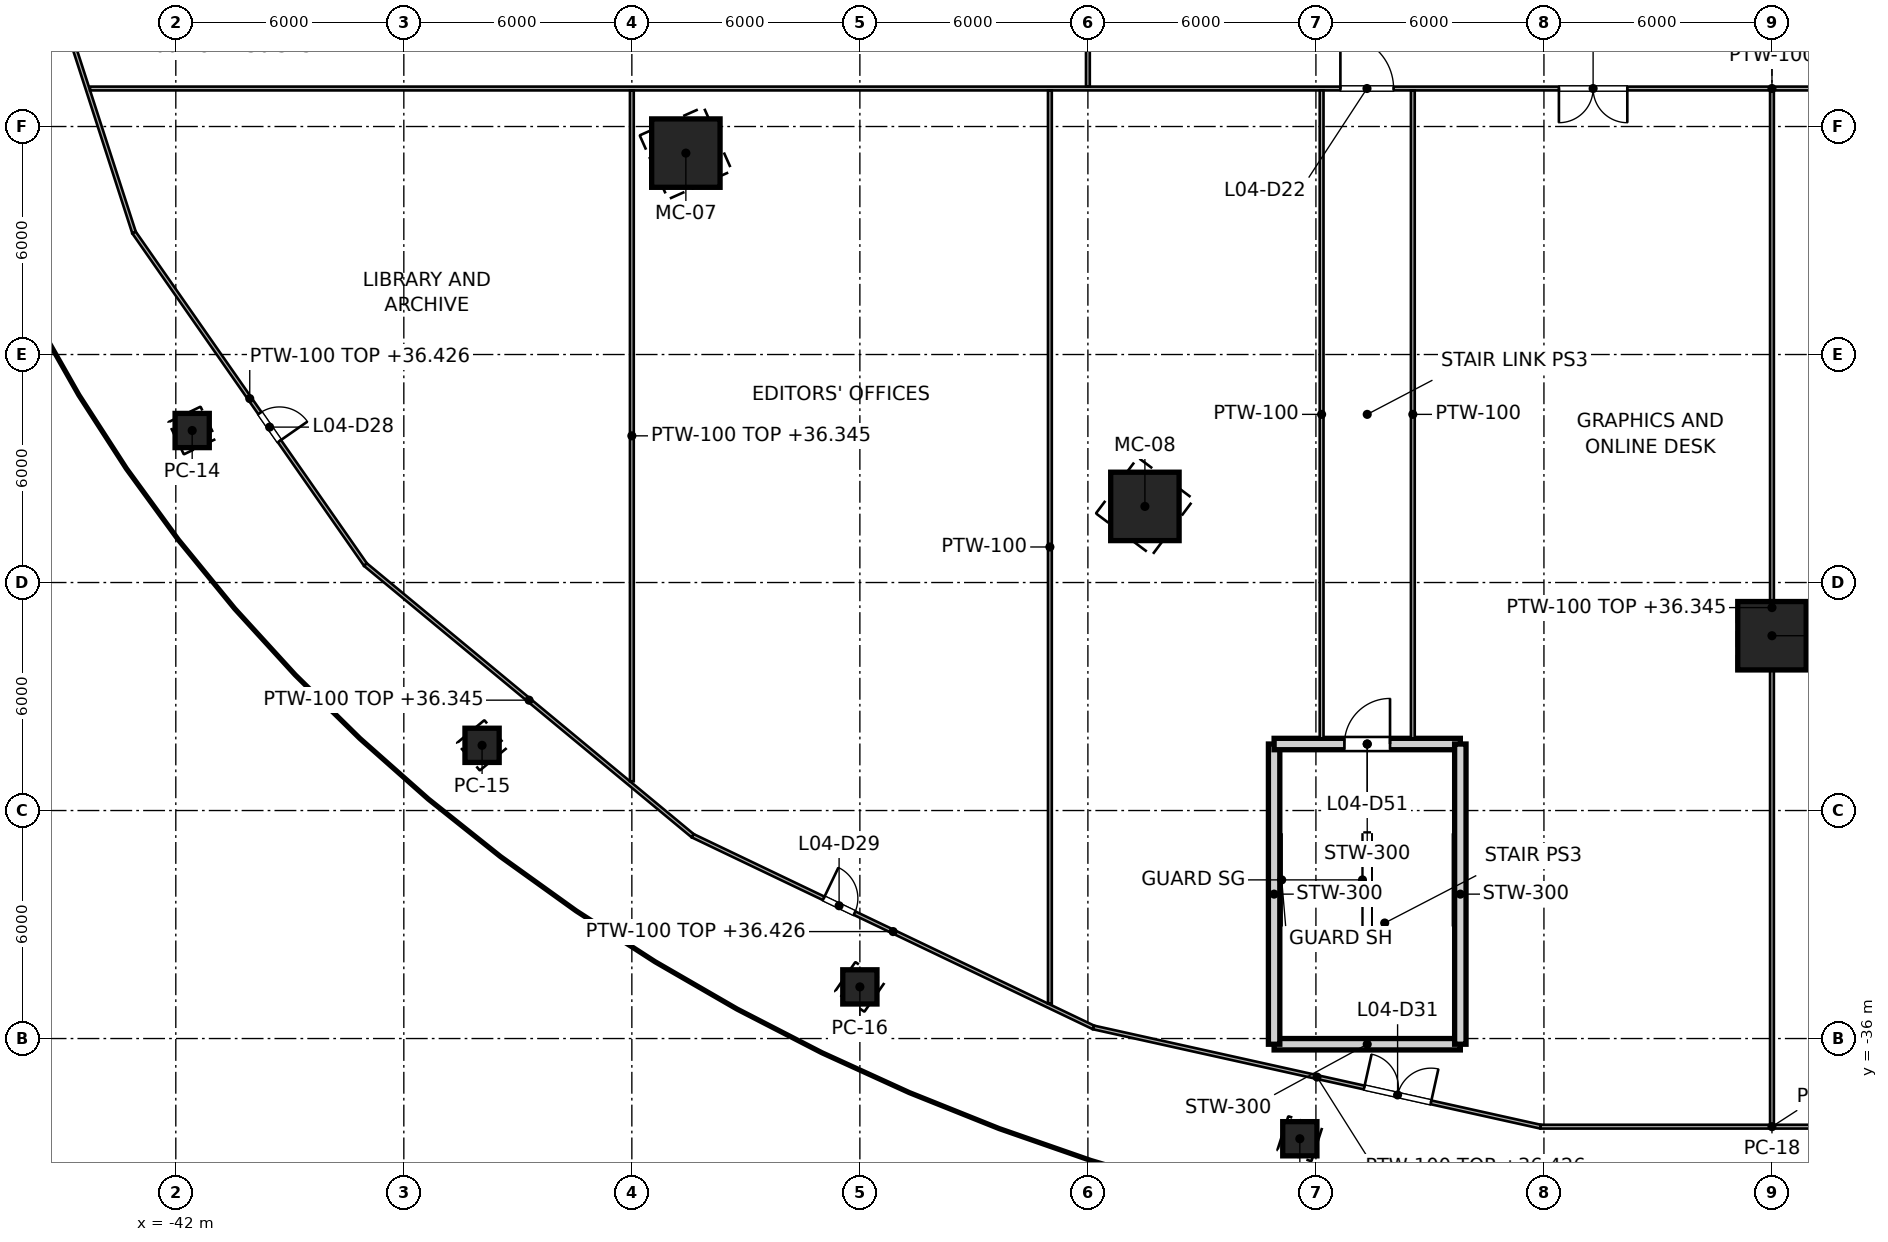
"""IFC4 building model, lengths in metres.
Left out: names, types, materials, properties, quantities, classifications, styles, units other than length and angle.
Written with IfcOpenShell. Run it as: python <this file> out.ifc"""

import sys

from ifc_helpers import new_model, si_unit, direction, frame, frame_2d, origin, origin_2d, place, context, subcontext, project, spatial, rectangle, hollow_rectangle, extrude, element, fill, save


model = new_model("IFC4")
c1 = context("Model", 3, precision=1e-05, world=origin(), true_north=direction((0.0, 1.0)))
c2 = subcontext(c1, "Body", "Model", "MODEL_VIEW")
j1 = project(units=[si_unit("LENGTHUNIT", "METRE"), si_unit("PLANEANGLEUNIT", "RADIAN")], contexts=[c1])
p1 = place(None, origin())
s1 = spatial("IfcSite", under=j1, at=p1, CompositionType="ELEMENT")
p2 = place(p1, origin())
s2 = spatial("IfcBuilding", under=s1, at=p2, CompositionType="ELEMENT")
p3 = place(p2, frame((0.0, 0.0, 31.4)))
s3 = spatial("IfcBuildingStorey", under=s2, at=p3, CompositionType="ELEMENT", Elevation=31.4)
for number, where, z_axis, x_axis in (
    (1, (-28.579, -12.7, 0.0), (0.0, 0.0, 1.0), (-0.914, -0.406, 0.0)),
    (2, (-16.5, -21.997, 0.0), (0.0, 0.0, 1.0), (-0.6, -0.8, 0.0)),
    (3, (0.0, -25.4, 0.0), (0.0, 0.0, 1.0), (0.0, -1.0, 0.0)),
):
    element("IfcColumn", number, at=place(p3, frame(where, z_axis=z_axis, x_axis=x_axis)), inside=s3, PredefinedType="COLUMN", context=c2, shape_type="SweptSolid", body=[
        extrude(hollow_rectangle(XDim=1.8, YDim=1.8, WallThickness=0.08, at=origin_2d()), origin(), (0.0, 0.0, 1.0), 6.0),
    ])
for number, where, z_axis, x_axis in (
    (4, (-41.569, -20.0, 0.0), (0.0, 0.0, 1.0), (-0.901, -0.434, 0.0)),
    (5, (-33.941, -28.284, 0.0), (0.0, 0.0, 1.0), (-0.768, -0.64, 0.0)),
    (6, (-24.0, -34.641, 0.0), (0.0, 0.0, 1.0), (-0.569, -0.822, 0.0)),
    (7, (-12.423, -38.637, 0.0), (0.0, 0.0, 1.0), (-0.306, -0.952, 0.0)),
):
    element("IfcColumn", number, at=place(p3, frame(where, z_axis=z_axis, x_axis=x_axis)), inside=s3, PredefinedType="COLUMN", context=c2, shape_type="SweptSolid", body=[
        extrude(hollow_rectangle(XDim=0.9, YDim=0.9, WallThickness=0.04, at=origin_2d()), origin(), (0.0, 0.0, 1.0), 6.0),
    ])
p4 = place(p3, frame((-8.2, -36.15, 0.0), z_axis=(0.0, 0.0, 1.0), x_axis=(-1.0, 0.0, 0.0)))
e8 = element("IfcWall", 8, at=p4, inside=s3, PredefinedType="SOLIDWALL", context=c2, shape_type="SweptSolid", body=[
    extrude(rectangle(XDim=4.9, YDim=0.3, at=frame_2d((2.45, 0.0))), origin(), (0.0, 0.0, 1.0), 5.8),
])
p5 = place(p3, frame((-13.1, -36.15, 0.0), z_axis=(0.0, 0.0, 1.0), x_axis=(0.0, 1.0, 0.0)))
e9 = element("IfcWall", 9, at=p5, inside=s3, PredefinedType="SOLIDWALL", context=c2, shape_type="SweptSolid", body=[
    extrude(rectangle(XDim=7.9, YDim=0.3, at=frame_2d((3.95, 0.0))), origin(), (0.0, 0.0, 1.0), 5.8),
])
p6 = place(p3, frame((-13.1, -28.25, 0.0), z_axis=(0.0, 0.0, 1.0), x_axis=(1.0, 0.0, 0.0)))
e10 = element("IfcWall", 10, at=p6, inside=s3, PredefinedType="SOLIDWALL", context=c2, shape_type="SweptSolid", body=[
    extrude(rectangle(XDim=4.9, YDim=0.3, at=frame_2d((2.45, 0.0))), origin(), (0.0, 0.0, 1.0), 5.8),
])
p7 = place(p6, frame((1.85, 0.0, 0.0)))
e11 = element("IfcOpeningElement", 11, at=p7, cuts=e10, PredefinedType="OPENING", context=c2, shape_type="SweptSolid", body=[
    extrude(rectangle(XDim=1.2, YDim=2.1, at=frame_2d((0.6, 1.05))), frame((0.0, 0.15, 0.0), z_axis=(0.0, -1.0, 0.0), x_axis=(1.0, 0.0, 0.0)), (0.0, 0.0, 1.0), 0.3),
])
p8 = place(p3, frame((-8.2, -28.25, 0.0), z_axis=(0.0, 0.0, 1.0), x_axis=(0.0, -1.0, 0.0)))
e12 = element("IfcWall", 12, at=p8, inside=s3, PredefinedType="SOLIDWALL", context=c2, shape_type="SweptSolid", body=[
    extrude(rectangle(XDim=7.9, YDim=0.3, at=frame_2d((3.95, 0.0))), origin(), (0.0, 0.0, 1.0), 5.8),
])
p9 = place(p3, frame((-46.251, -5.045, 0.0), z_axis=(0.0, 0.0, 1.0), x_axis=(0.307713034182, -0.951479210805, 0.0)))
e13 = element("IfcWall", 13, at=p9, inside=s3, PredefinedType="PARTITIONING", context=c2, shape_type="SweptSolid", body=[
    extrude(rectangle(XDim=10.243, YDim=0.1, at=frame_2d((5.122, 0.0))), origin(), (0.0, 0.0, 1.0), 4.945),
])
p10 = place(p3, frame((-43.099, -14.791, 0.0), z_axis=(0.0, 0.0, 1.0), x_axis=(0.571737958261, -0.820436290692, 0.0)))
e14 = element("IfcWall", 14, at=p10, inside=s3, PredefinedType="PARTITIONING", context=c2, shape_type="SweptSolid", body=[
    extrude(rectangle(XDim=10.65, YDim=0.1, at=frame_2d((5.325, 0.0))), origin(), (0.0, 0.0, 1.0), 5.026),
])
p11 = place(p10, frame((5.79, 0.0, 0.0)))
e15 = element("IfcOpeningElement", 15, at=p11, cuts=e14, PredefinedType="OPENING", context=c2, shape_type="SweptSolid", body=[
    extrude(rectangle(XDim=0.9, YDim=2.1, at=frame_2d((0.45, 1.05))), frame((0.0, 0.05, 0.0), z_axis=(0.0, -1.0, 0.0), x_axis=(1.0, 0.0, 0.0)), (0.0, 0.0, 1.0), 0.1),
])
p12 = place(p3, frame((-37.01, -23.529, 0.0), z_axis=(0.0, 0.0, 1.0), x_axis=(0.770046995363, -0.637987166746, 0.0)))
e16 = element("IfcWall", 16, at=p12, inside=s3, PredefinedType="PARTITIONING", context=c2, shape_type="SweptSolid", body=[
    extrude(rectangle(XDim=11.183, YDim=0.1, at=frame_2d((5.591, 0.0))), origin(), (0.0, 0.0, 1.0), 4.945),
])
p13 = place(p3, frame((-28.399, -30.663, 0.0), z_axis=(0.0, 0.0, 1.0), x_axis=(0.902100999032, -0.431524955878, 0.0)))
e17 = element("IfcWall", 17, at=p13, inside=s3, PredefinedType="PARTITIONING", context=c2, shape_type="SweptSolid", body=[
    extrude(rectangle(XDim=11.691, YDim=0.1, at=frame_2d((5.845, 0.0))), origin(), (0.0, 0.0, 1.0), 5.026),
])
p14 = place(p13, frame((3.82, 0.0, 0.0)))
e18 = element("IfcOpeningElement", 18, at=p14, cuts=e17, PredefinedType="OPENING", context=c2, shape_type="SweptSolid", body=[
    extrude(rectangle(XDim=0.9, YDim=2.1, at=frame_2d((0.45, 1.05))), frame((0.0, 0.05, 0.0), z_axis=(0.0, -1.0, 0.0), x_axis=(1.0, 0.0, 0.0)), (0.0, 0.0, 1.0), 0.1),
])
p15 = place(p3, frame((-17.852, -35.708, 0.0), z_axis=(0.0, 0.0, 1.0), x_axis=(0.97623471049, -0.216715920124, 0.0)))
e19 = element("IfcWall", 19, at=p15, inside=s3, PredefinedType="PARTITIONING", context=c2, shape_type="SweptSolid", body=[
    extrude(rectangle(XDim=12.05, YDim=0.1, at=frame_2d((6.025, 0.0))), origin(), (0.0, 0.0, 1.0), 5.026),
])
p16 = place(p15, frame((7.296, 0.0, 0.0)))
e20 = element("IfcOpeningElement", 20, at=p16, cuts=e19, PredefinedType="OPENING", context=c2, shape_type="SweptSolid", body=[
    extrude(rectangle(XDim=1.8, YDim=2.1, at=frame_2d((0.9, 1.05))), frame((0.0, 0.05, 0.0), z_axis=(0.0, -1.0, 0.0), x_axis=(1.0, 0.0, 0.0)), (0.0, 0.0, 1.0), 0.1),
])
p17 = place(p3, frame((-6.089, -38.319, 0.0), z_axis=(0.0, 0.0, 1.0), x_axis=(1.0, 0.0, 0.0)))
e21 = element("IfcWall", 21, at=p17, inside=s3, PredefinedType="PARTITIONING", context=c2, shape_type="SweptSolid", body=[
    extrude(rectangle(XDim=12.178, YDim=0.1, at=frame_2d((6.089, 0.0))), origin(), (0.0, 0.0, 1.0), 5.026),
])
p18 = place(p3, frame((-44.256, -11.0, 0.0), z_axis=(0.0, 0.0, 1.0), x_axis=(1.0, 0.0, 0.0)))
e22 = element("IfcWall", 22, at=p18, inside=s3, PredefinedType="PARTITIONING", context=c2, shape_type="SweptSolid", body=[
    extrude(rectangle(XDim=88.512, YDim=0.1, at=frame_2d((44.256, 0.0))), origin(), (0.0, 0.0, 1.0), 4.868),
])
p19 = place(p18, frame((32.9, 0.0, 0.0)))
e23 = element("IfcOpeningElement", 23, at=p19, cuts=e22, PredefinedType="OPENING", context=c2, shape_type="SweptSolid", body=[
    extrude(rectangle(XDim=1.4, YDim=2.1, at=frame_2d((0.7, 1.05))), frame((0.0, 0.05, 0.0), z_axis=(0.0, -1.0, 0.0), x_axis=(1.0, 0.0, 0.0)), (0.0, 0.0, 1.0), 0.1),
])
p20 = place(p18, frame((54.2, 0.0, 0.0)))
e24 = element("IfcOpeningElement", 24, at=p20, cuts=e22, PredefinedType="OPENING", context=c2, shape_type="SweptSolid", body=[
    extrude(rectangle(XDim=1.4, YDim=2.1, at=frame_2d((0.7, 1.05))), frame((0.0, 0.05, 0.0), z_axis=(0.0, -1.0, 0.0), x_axis=(1.0, 0.0, 0.0)), (0.0, 0.0, 1.0), 0.1),
])
p21 = place(p18, frame((38.65, 0.0, 0.0)))
e25 = element("IfcOpeningElement", 25, at=p21, cuts=e22, PredefinedType="OPENING", context=c2, shape_type="SweptSolid", body=[
    extrude(rectangle(XDim=1.8, YDim=2.1, at=frame_2d((0.9, 1.05))), frame((0.0, 0.05, 0.0), z_axis=(0.0, -1.0, 0.0), x_axis=(1.0, 0.0, 0.0)), (0.0, 0.0, 1.0), 0.1),
])
p22 = place(p18, frame((48.1, 0.0, 0.0)))
e26 = element("IfcOpeningElement", 26, at=p22, cuts=e22, PredefinedType="OPENING", context=c2, shape_type="SweptSolid", body=[
    extrude(rectangle(XDim=1.8, YDim=2.1, at=frame_2d((0.9, 1.05))), frame((0.0, 0.05, 0.0), z_axis=(0.0, -1.0, 0.0), x_axis=(1.0, 0.0, 0.0)), (0.0, 0.0, 1.0), 0.1),
])
p23 = place(p3, frame((-18.0, -10.95, 0.0), z_axis=(0.0, 0.0, 1.0), x_axis=(0.0, 1.0, 0.0)))
e27 = element("IfcWall", 27, at=p23, inside=s3, PredefinedType="PARTITIONING", context=c2, shape_type="SweptSolid", body=[
    extrude(rectangle(XDim=21.9, YDim=0.1, at=frame_2d((10.95, 0.0))), origin(), (0.0, 0.0, 1.0), 4.877),
])
p24 = place(p23, frame((19.75, 0.0, 0.0)))
e28 = element("IfcOpeningElement", 28, at=p24, cuts=e27, PredefinedType="OPENING", context=c2, shape_type="SweptSolid", body=[
    extrude(rectangle(XDim=0.9, YDim=2.1, at=frame_2d((0.45, 1.05))), frame((0.0, 0.05, 0.0), z_axis=(0.0, -1.0, 0.0), x_axis=(1.0, 0.0, 0.0)), (0.0, 0.0, 1.0), 0.1),
])
p25 = place(p23, frame((5.85, 0.0, 0.0)))
e29 = element("IfcOpeningElement", 29, at=p25, cuts=e27, PredefinedType="OPENING", context=c2, shape_type="SweptSolid", body=[
    extrude(rectangle(XDim=0.9, YDim=2.1, at=frame_2d((0.45, 1.05))), frame((0.0, 0.05, 0.0), z_axis=(0.0, -1.0, 0.0), x_axis=(1.0, 0.0, 0.0)), (0.0, 0.0, 1.0), 0.1),
])
p26 = place(p23, frame((10.45, 0.0, 0.0)))
e30 = element("IfcOpeningElement", 30, at=p26, cuts=e27, PredefinedType="OPENING", context=c2, shape_type="SweptSolid", body=[
    extrude(rectangle(XDim=0.9, YDim=2.1, at=frame_2d((0.45, 1.05))), frame((0.0, 0.05, 0.0), z_axis=(0.0, -1.0, 0.0), x_axis=(1.0, 0.0, 0.0)), (0.0, 0.0, 1.0), 0.1),
])
p27 = place(p23, frame((15.05, 0.0, 0.0)))
e31 = element("IfcOpeningElement", 31, at=p27, cuts=e27, PredefinedType="OPENING", context=c2, shape_type="SweptSolid", body=[
    extrude(rectangle(XDim=0.9, YDim=2.1, at=frame_2d((0.45, 1.05))), frame((0.0, 0.05, 0.0), z_axis=(0.0, -1.0, 0.0), x_axis=(1.0, 0.0, 0.0)), (0.0, 0.0, 1.0), 0.1),
])
p28 = place(p3, frame((-30.0, -11.05, 0.0), z_axis=(0.0, 0.0, 1.0), x_axis=(0.0, -1.0, 0.0)))
e32 = element("IfcWall", 32, at=p28, inside=s3, PredefinedType="PARTITIONING", context=c2, shape_type="SweptSolid", body=[
    extrude(rectangle(XDim=18.18, YDim=0.1, at=frame_2d((9.09, 0.0))), origin(), (0.0, 0.0, 1.0), 4.945),
])
p29 = place(p3, frame((-19.0, -11.05, 0.0), z_axis=(0.0, 0.0, 1.0), x_axis=(0.0, -1.0, 0.0)))
e33 = element("IfcWall", 33, at=p29, inside=s3, PredefinedType="PARTITIONING", context=c2, shape_type="SweptSolid", body=[
    extrude(rectangle(XDim=24.03, YDim=0.1, at=frame_2d((12.015, 0.0))), origin(), (0.0, 0.0, 1.0), 4.868),
])
p30 = place(p3, frame((0.0, -11.05, 0.0), z_axis=(0.0, 0.0, 1.0), x_axis=(0.0, -1.0, 0.0)))
e34 = element("IfcWall", 34, at=p30, inside=s3, PredefinedType="PARTITIONING", context=c2, shape_type="SweptSolid", body=[
    extrude(rectangle(XDim=27.219, YDim=0.1, at=frame_2d((13.61, 0.0))), origin(), (0.0, 0.0, 1.0), 4.945),
])
for number, where, z_axis, x_axis in (
    (35, (-11.85, -11.05, 0.0), (0.0, 0.0, 1.0), (0.0, -1.0, 0.0)),
    (36, (-9.45, -11.05, 0.0), (0.0, 0.0, 1.0), (0.0, -1.0, 0.0)),
):
    element("IfcWall", number, at=place(p3, frame(where, z_axis=z_axis, x_axis=x_axis)), inside=s3, PredefinedType="PARTITIONING", context=c2, shape_type="SweptSolid", body=[
        extrude(rectangle(XDim=17.05, YDim=0.1, at=frame_2d((8.525, 0.0))), origin(), (0.0, 0.0, 1.0), 4.868),
    ])
p31 = place(p19, origin())
e37 = element("IfcDoor", 37, at=p31, inside=s3, OperationType="SINGLE_SWING_LEFT", PredefinedType="DOOR", context=c2, shape_type="SweptSolid", body=[
    extrude(rectangle(XDim=1.4, YDim=2.1, at=frame_2d((0.7, 1.05))), frame((0.0, 0.025, 0.0), z_axis=(0.0, -1.0, 0.0), x_axis=(1.0, 0.0, 0.0)), (0.0, 0.0, 1.0), 0.05),
])
fill(e23, e37)
p32 = place(p11, origin())
e38 = element("IfcDoor", 38, at=p32, inside=s3, OperationType="SINGLE_SWING_RIGHT", PredefinedType="DOOR", context=c2, shape_type="SweptSolid", body=[
    extrude(rectangle(XDim=0.9, YDim=2.1, at=frame_2d((0.45, 1.05))), frame((0.0, 0.025, 0.0), z_axis=(0.0, -1.0, 0.0), x_axis=(1.0, 0.0, 0.0)), (0.0, 0.0, 1.0), 0.05),
])
fill(e15, e38)
p33 = place(p14, origin())
e39 = element("IfcDoor", 39, at=p33, inside=s3, OperationType="SINGLE_SWING_LEFT", PredefinedType="DOOR", context=c2, shape_type="SweptSolid", body=[
    extrude(rectangle(XDim=0.9, YDim=2.1, at=frame_2d((0.45, 1.05))), frame((0.0, 0.025, 0.0), z_axis=(0.0, -1.0, 0.0), x_axis=(1.0, 0.0, 0.0)), (0.0, 0.0, 1.0), 0.05),
])
fill(e18, e39)
p34 = place(p21, origin())
e40 = element("IfcDoor", 40, at=p34, inside=s3, OperationType="DOUBLE_DOOR_SINGLE_SWING", PredefinedType="DOOR", context=c2, shape_type="SweptSolid", body=[
    extrude(rectangle(XDim=1.8, YDim=2.1, at=frame_2d((0.9, 1.05))), frame((0.0, 0.025, 0.0), z_axis=(0.0, -1.0, 0.0), x_axis=(1.0, 0.0, 0.0)), (0.0, 0.0, 1.0), 0.05),
])
fill(e25, e40)
p35 = place(p16, origin())
e41 = element("IfcDoor", 41, at=p35, inside=s3, OperationType="DOUBLE_DOOR_SINGLE_SWING", PredefinedType="DOOR", context=c2, shape_type="SweptSolid", body=[
    extrude(rectangle(XDim=1.8, YDim=2.1, at=frame_2d((0.9, 1.05))), frame((0.0, 0.025, 0.0), z_axis=(0.0, -1.0, 0.0), x_axis=(1.0, 0.0, 0.0)), (0.0, 0.0, 1.0), 0.05),
])
fill(e20, e41)
p36 = place(p7, origin())
e42 = element("IfcDoor", 42, at=p36, inside=s3, OperationType="SINGLE_SWING_RIGHT", PredefinedType="DOOR", context=c2, shape_type="SweptSolid", body=[
    extrude(rectangle(XDim=1.2, YDim=2.1, at=frame_2d((0.6, 1.05))), frame((0.0, 0.025, 0.0), z_axis=(0.0, -1.0, 0.0), x_axis=(1.0, 0.0, 0.0)), (0.0, 0.0, 1.0), 0.05),
])
fill(e11, e42)
save(model, sys.argv[1])
